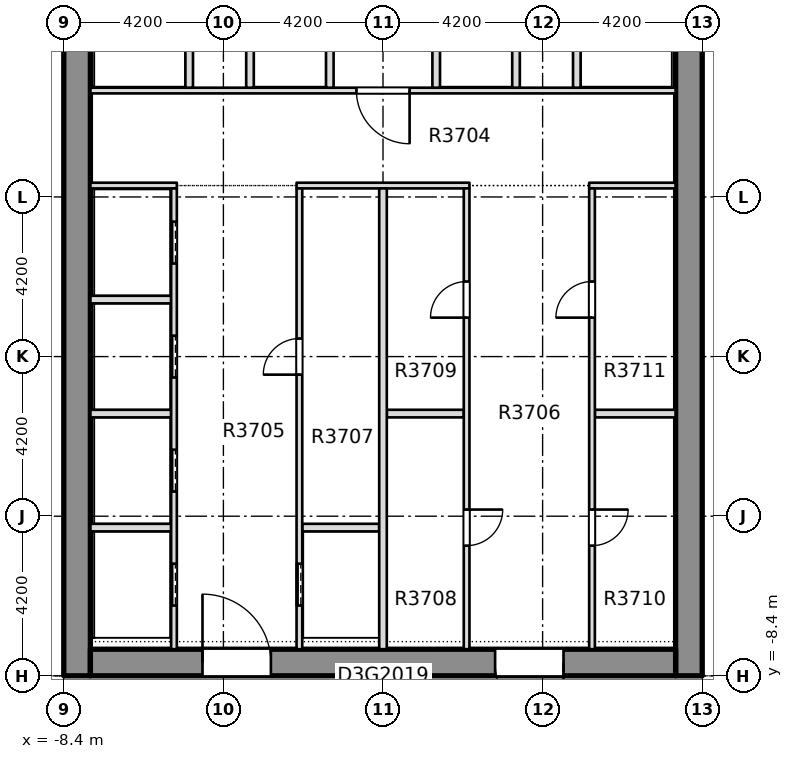
"""IFC4 building model, lengths in metres.
Left out: names, types, materials, properties, quantities, classifications, styles, units other than length and angle.
Written with IfcOpenShell. Run it as: python <this file> out.ifc"""

import sys

from ifc_helpers import new_model, si_unit, direction, frame, frame_2d, origin, place, context, subcontext, project, spatial, rectangle, extrude, element, fill, save


model = new_model("IFC4")
c1 = context("Model", 3, precision=1e-05, world=origin(), true_north=direction((0.0, 1.0)))
c2 = subcontext(c1, "Body", "Model", "MODEL_VIEW")
j1 = project(units=[si_unit("LENGTHUNIT", "METRE"), si_unit("PLANEANGLEUNIT", "RADIAN")], contexts=[c1])
p1 = place(None, origin())
s1 = spatial("IfcSite", under=j1, at=p1, CompositionType="ELEMENT")
p2 = place(p1, origin())
s2 = spatial("IfcBuilding", under=s1, at=p2, CompositionType="ELEMENT")
p3 = place(p2, frame((0.0, 0.0, 146.9)))
s3 = spatial("IfcBuildingStorey", under=s2, at=p3, CompositionType="ELEMENT", Elevation=146.9)
p4 = place(p3, frame((8.05, -8.4, -0.4), z_axis=(0.0, 0.0, 1.0), x_axis=(0.0, 1.0, 0.0)))
e1 = element("IfcWall", 1, at=p4, inside=s3, PredefinedType="SOLIDWALL", context=c2, shape_type="SweptSolid", body=[
    extrude(rectangle(XDim=30.15, YDim=0.7, at=frame_2d((15.075, 0.0))), origin(), (0.0, 0.0, 1.0), 3.45),
])
p5 = place(p4, frame((19.3, 0.0, 0.4)))
e2 = element("IfcOpeningElement", 2, at=p5, cuts=e1, PredefinedType="OPENING", context=c2, shape_type="SweptSolid", body=[
    extrude(rectangle(XDim=1.2, YDim=2.1, at=frame_2d((0.6, 1.05))), frame((0.0, 0.36, 0.0), z_axis=(0.0, -1.0, 0.0), x_axis=(1.0, 0.0, 0.0)), (0.0, 0.0, 1.0), 0.72),
])
p6 = place(p3, frame((-8.05, -8.4, -0.4), z_axis=(0.0, 0.0, 1.0), x_axis=(0.0, 1.0, 0.0)))
e3 = element("IfcWall", 3, at=p6, inside=s3, PredefinedType="SOLIDWALL", context=c2, shape_type="SweptSolid", body=[
    extrude(rectangle(XDim=30.15, YDim=0.7, at=frame_2d((15.075, 0.0))), origin(), (0.0, 0.0, 1.0), 3.45),
])
p7 = place(p6, frame((19.3, 0.0, 0.4)))
e4 = element("IfcOpeningElement", 4, at=p7, cuts=e3, PredefinedType="OPENING", context=c2, shape_type="SweptSolid", body=[
    extrude(rectangle(XDim=1.2, YDim=2.1, at=frame_2d((0.6, 1.05))), frame((0.0, 0.36, 0.0), z_axis=(0.0, -1.0, 0.0), x_axis=(1.0, 0.0, 0.0)), (0.0, 0.0, 1.0), 0.72),
])
p8 = place(p3, frame((-7.7, -8.05, -0.4), z_axis=(0.0, 0.0, 1.0), x_axis=(1.0, 0.0, 0.0)))
e5 = element("IfcWall", 5, at=p8, inside=s3, PredefinedType="SHEAR", context=c2, shape_type="SweptSolid", body=[
    extrude(rectangle(XDim=15.4, YDim=0.7, at=frame_2d((7.7, 0.0))), origin(), (0.0, 0.0, 1.0), 3.45),
])
p9 = place(p8, frame((2.95, 0.0, 0.4)))
e6 = element("IfcOpeningElement", 6, at=p9, cuts=e5, PredefinedType="OPENING", context=c2, shape_type="SweptSolid", body=[
    extrude(rectangle(XDim=1.8, YDim=2.1, at=frame_2d((0.9, 1.05))), frame((0.0, 0.36, 0.0), z_axis=(0.0, -1.0, 0.0), x_axis=(1.0, 0.0, 0.0)), (0.0, 0.0, 1.0), 0.72),
])
p10 = place(p8, frame((10.65, 0.0, 0.4)))
e7 = element("IfcOpeningElement", 7, at=p10, cuts=e5, PredefinedType="OPENING", context=c2, shape_type="SweptSolid", body=[
    extrude(rectangle(XDim=1.8, YDim=2.1, at=frame_2d((0.9, 1.05))), frame((0.0, 0.36, 0.0), z_axis=(0.0, -1.0, 0.0), x_axis=(1.0, 0.0, 0.0)), (0.0, 0.0, 1.0), 0.72),
])
p11 = place(p3, frame((-7.699, -4.5, 0.0), z_axis=(0.0, 0.0, 1.0), x_axis=(1.0, 0.0, 0.0)))
e8 = element("IfcWall", 8, at=p11, inside=s3, PredefinedType="PARTITIONING", context=c2, shape_type="SweptSolid", body=[
    extrude(rectangle(XDim=2.124, YDim=0.2, at=frame_2d((1.062, 0.0))), origin(), (0.0, 0.0, 1.0), 3.05),
])
p12 = place(p3, frame((-2.125, -4.5, 0.0), z_axis=(0.0, 0.0, 1.0), x_axis=(1.0, 0.0, 0.0)))
e9 = element("IfcWall", 9, at=p12, inside=s3, PredefinedType="PARTITIONING", context=c2, shape_type="SweptSolid", body=[
    extrude(rectangle(XDim=2.025, YDim=0.2, at=frame_2d((1.012, 0.0))), origin(), (0.0, 0.0, 1.0), 3.05),
])
p13 = place(p3, frame((-7.699, -1.5, 0.0), z_axis=(0.0, 0.0, 1.0), x_axis=(1.0, 0.0, 0.0)))
e10 = element("IfcWall", 10, at=p13, inside=s3, PredefinedType="PARTITIONING", context=c2, shape_type="SweptSolid", body=[
    extrude(rectangle(XDim=2.124, YDim=0.2, at=frame_2d((1.062, 0.0))), origin(), (0.0, 0.0, 1.0), 3.05),
])
p14 = place(p3, frame((0.1, -1.5, 0.0), z_axis=(0.0, 0.0, 1.0), x_axis=(1.0, 0.0, 0.0)))
e11 = element("IfcWall", 11, at=p14, inside=s3, PredefinedType="PARTITIONING", context=c2, shape_type="SweptSolid", body=[
    extrude(rectangle(XDim=2.025, YDim=0.2, at=frame_2d((1.012, 0.0))), origin(), (0.0, 0.0, 1.0), 3.05),
])
for number, where, z_axis, x_axis in (
    (12, (5.575, -1.5, 0.0), (0.0, 0.0, 1.0), (1.0, 0.0, 0.0)),
    (13, (-7.699, 1.5, 0.0), (0.0, 0.0, 1.0), (1.0, 0.0, 0.0)),
):
    element("IfcWall", number, at=place(p3, frame(where, z_axis=z_axis, x_axis=x_axis)), inside=s3, PredefinedType="PARTITIONING", context=c2, shape_type="SweptSolid", body=[
        extrude(rectangle(XDim=2.124, YDim=0.2, at=frame_2d((1.062, 0.0))), origin(), (0.0, 0.0, 1.0), 3.05),
    ])
p15 = place(p3, frame((-7.699, 4.5, 0.0), z_axis=(0.0, 0.0, 1.0), x_axis=(1.0, 0.0, 0.0)))
e14 = element("IfcWall", 14, at=p15, inside=s3, PredefinedType="PARTITIONING", context=c2, shape_type="SweptSolid", body=[
    extrude(rectangle(XDim=2.274, YDim=0.15, at=frame_2d((1.137, 0.0))), origin(), (0.0, 0.0, 1.0), 3.05),
])
p16 = place(p3, frame((-2.275, 4.5, 0.0), z_axis=(0.0, 0.0, 1.0), x_axis=(1.0, 0.0, 0.0)))
e15 = element("IfcWall", 15, at=p16, inside=s3, PredefinedType="PARTITIONING", context=c2, shape_type="SweptSolid", body=[
    extrude(rectangle(XDim=4.55, YDim=0.15, at=frame_2d((2.275, 0.0))), origin(), (0.0, 0.0, 1.0), 3.05),
])
p17 = place(p3, frame((5.425, 4.5, 0.0), z_axis=(0.0, 0.0, 1.0), x_axis=(1.0, 0.0, 0.0)))
e16 = element("IfcWall", 16, at=p17, inside=s3, PredefinedType="PARTITIONING", context=c2, shape_type="SweptSolid", body=[
    extrude(rectangle(XDim=2.274, YDim=0.15, at=frame_2d((1.137, 0.0))), origin(), (0.0, 0.0, 1.0), 3.05),
])
p18 = place(p3, frame((-7.699, 7.0, 0.0), z_axis=(0.0, 0.0, 1.0), x_axis=(1.0, 0.0, 0.0)))
e17 = element("IfcWall", 17, at=p18, inside=s3, PredefinedType="PARTITIONING", context=c2, shape_type="SweptSolid", body=[
    extrude(rectangle(XDim=15.398, YDim=0.15, at=frame_2d((7.699, 0.0))), origin(), (0.0, 0.0, 1.0), 3.05),
])
p19 = place(p18, frame((6.999, 0.0, 0.0)))
e18 = element("IfcOpeningElement", 18, at=p19, cuts=e17, PredefinedType="OPENING", context=c2, shape_type="SweptSolid", body=[
    extrude(rectangle(XDim=1.4, YDim=2.1, at=frame_2d((0.7, 1.05))), frame((0.0, 0.085, 0.0), z_axis=(0.0, -1.0, 0.0), x_axis=(1.0, 0.0, 0.0)), (0.0, 0.0, 1.0), 0.17),
])
p20 = place(p3, frame((-5.5, -7.699, 0.0), z_axis=(0.0, 0.0, 1.0), x_axis=(0.0, 1.0, 0.0)))
e19 = element("IfcWall", 19, at=p20, inside=s3, PredefinedType="PARTITIONING", context=c2, shape_type="SweptSolid", body=[
    extrude(rectangle(XDim=12.124, YDim=0.15, at=frame_2d((6.062, 0.0))), origin(), (0.0, 0.0, 1.0), 3.05),
])
p21 = place(p20, frame((1.149, 0.0, 0.0)))
e20 = element("IfcOpeningElement", 20, at=p21, cuts=e19, PredefinedType="OPENING", context=c2, shape_type="SweptSolid", body=[
    extrude(rectangle(XDim=1.1, YDim=2.1, at=frame_2d((0.55, 1.05))), frame((0.0, 0.085, 0.0), z_axis=(0.0, -1.0, 0.0), x_axis=(1.0, 0.0, 0.0)), (0.0, 0.0, 1.0), 0.17),
])
p22 = place(p20, frame((4.149, 0.0, 0.0)))
e21 = element("IfcOpeningElement", 21, at=p22, cuts=e19, PredefinedType="OPENING", context=c2, shape_type="SweptSolid", body=[
    extrude(rectangle(XDim=1.1, YDim=2.1, at=frame_2d((0.55, 1.05))), frame((0.0, 0.085, 0.0), z_axis=(0.0, -1.0, 0.0), x_axis=(1.0, 0.0, 0.0)), (0.0, 0.0, 1.0), 0.17),
])
p23 = place(p20, frame((7.149, 0.0, 0.0)))
e22 = element("IfcOpeningElement", 22, at=p23, cuts=e19, PredefinedType="OPENING", context=c2, shape_type="SweptSolid", body=[
    extrude(rectangle(XDim=1.1, YDim=2.1, at=frame_2d((0.55, 1.05))), frame((0.0, 0.085, 0.0), z_axis=(0.0, -1.0, 0.0), x_axis=(1.0, 0.0, 0.0)), (0.0, 0.0, 1.0), 0.17),
])
p24 = place(p20, frame((10.149, 0.0, 0.0)))
e23 = element("IfcOpeningElement", 23, at=p24, cuts=e19, PredefinedType="OPENING", context=c2, shape_type="SweptSolid", body=[
    extrude(rectangle(XDim=1.1, YDim=2.1, at=frame_2d((0.55, 1.05))), frame((0.0, 0.085, 0.0), z_axis=(0.0, -1.0, 0.0), x_axis=(1.0, 0.0, 0.0)), (0.0, 0.0, 1.0), 0.17),
])
p25 = place(p3, frame((-5.1, 7.075, 0.0), z_axis=(0.0, 0.0, 1.0), x_axis=(0.0, 1.0, 0.0)))
e24 = element("IfcWall", 24, at=p25, inside=s3, PredefinedType="PARTITIONING", context=c2, shape_type="SweptSolid", body=[
    extrude(rectangle(XDim=2.725, YDim=0.2, at=frame_2d((1.363, 0.0))), origin(), (0.0, 0.0, 1.0), 3.05),
])
p26 = place(p3, frame((-3.5, 7.075, 0.0), z_axis=(0.0, 0.0, 1.0), x_axis=(0.0, 1.0, 0.0)))
e25 = element("IfcWall", 25, at=p26, inside=s3, PredefinedType="PARTITIONING", context=c2, shape_type="SweptSolid", body=[
    extrude(rectangle(XDim=2.85, YDim=0.2, at=frame_2d((1.425, 0.0))), origin(), (0.0, 0.0, 1.0), 3.05),
])
p27 = place(p3, frame((-2.2, -7.699, 0.0), z_axis=(0.0, 0.0, 1.0), x_axis=(0.0, 1.0, 0.0)))
e26 = element("IfcWall", 26, at=p27, inside=s3, PredefinedType="PARTITIONING", context=c2, shape_type="SweptSolid", body=[
    extrude(rectangle(XDim=12.124, YDim=0.15, at=frame_2d((6.062, 0.0))), origin(), (0.0, 0.0, 1.0), 3.05),
])
p28 = place(p27, frame((1.149, 0.0, 0.0)))
e27 = element("IfcOpeningElement", 27, at=p28, cuts=e26, PredefinedType="OPENING", context=c2, shape_type="SweptSolid", body=[
    extrude(rectangle(XDim=1.1, YDim=2.1, at=frame_2d((0.55, 1.05))), frame((0.0, 0.085, 0.0), z_axis=(0.0, -1.0, 0.0), x_axis=(1.0, 0.0, 0.0)), (0.0, 0.0, 1.0), 0.17),
])
p29 = place(p27, frame((7.224, 0.0, 0.0)))
e28 = element("IfcOpeningElement", 28, at=p29, cuts=e26, PredefinedType="OPENING", context=c2, shape_type="SweptSolid", body=[
    extrude(rectangle(XDim=0.95, YDim=2.1, at=frame_2d((0.475, 1.05))), frame((0.0, 0.085, 0.0), z_axis=(0.0, -1.0, 0.0), x_axis=(1.0, 0.0, 0.0)), (0.0, 0.0, 1.0), 0.17),
])
p30 = place(p3, frame((-1.4, 7.075, 0.0), z_axis=(0.0, 0.0, 1.0), x_axis=(0.0, 1.0, 0.0)))
e29 = element("IfcWall", 29, at=p30, inside=s3, PredefinedType="PARTITIONING", context=c2, shape_type="SweptSolid", body=[
    extrude(rectangle(XDim=2.85, YDim=0.2, at=frame_2d((1.425, 0.0))), origin(), (0.0, 0.0, 1.0), 3.05),
])
p31 = place(p3, frame((0.0, -7.699, 0.0), z_axis=(0.0, 0.0, 1.0), x_axis=(0.0, 1.0, 0.0)))
e30 = element("IfcWall", 30, at=p31, inside=s3, PredefinedType="PARTITIONING", context=c2, shape_type="SweptSolid", body=[
    extrude(rectangle(XDim=12.124, YDim=0.2, at=frame_2d((6.062, 0.0))), origin(), (0.0, 0.0, 1.0), 3.05),
])
p32 = place(p3, frame((1.4, 7.075, 0.0), z_axis=(0.0, 0.0, 1.0), x_axis=(0.0, 1.0, 0.0)))
e31 = element("IfcWall", 31, at=p32, inside=s3, PredefinedType="PARTITIONING", context=c2, shape_type="SweptSolid", body=[
    extrude(rectangle(XDim=2.85, YDim=0.2, at=frame_2d((1.425, 0.0))), origin(), (0.0, 0.0, 1.0), 3.05),
])
p33 = place(p3, frame((2.2, -7.699, 0.0), z_axis=(0.0, 0.0, 1.0), x_axis=(0.0, 1.0, 0.0)))
e32 = element("IfcWall", 32, at=p33, inside=s3, PredefinedType="PARTITIONING", context=c2, shape_type="SweptSolid", body=[
    extrude(rectangle(XDim=12.124, YDim=0.15, at=frame_2d((6.062, 0.0))), origin(), (0.0, 0.0, 1.0), 3.05),
])
p34 = place(p33, frame((2.724, 0.0, 0.0)))
e33 = element("IfcOpeningElement", 33, at=p34, cuts=e32, PredefinedType="OPENING", context=c2, shape_type="SweptSolid", body=[
    extrude(rectangle(XDim=0.95, YDim=2.1, at=frame_2d((0.475, 1.05))), frame((0.0, 0.085, 0.0), z_axis=(0.0, -1.0, 0.0), x_axis=(1.0, 0.0, 0.0)), (0.0, 0.0, 1.0), 0.17),
])
p35 = place(p33, frame((8.724, 0.0, 0.0)))
e34 = element("IfcOpeningElement", 34, at=p35, cuts=e32, PredefinedType="OPENING", context=c2, shape_type="SweptSolid", body=[
    extrude(rectangle(XDim=0.95, YDim=2.1, at=frame_2d((0.475, 1.05))), frame((0.0, 0.085, 0.0), z_axis=(0.0, -1.0, 0.0), x_axis=(1.0, 0.0, 0.0)), (0.0, 0.0, 1.0), 0.17),
])
p36 = place(p3, frame((3.5, 7.075, 0.0), z_axis=(0.0, 0.0, 1.0), x_axis=(0.0, 1.0, 0.0)))
e35 = element("IfcWall", 35, at=p36, inside=s3, PredefinedType="PARTITIONING", context=c2, shape_type="SweptSolid", body=[
    extrude(rectangle(XDim=2.85, YDim=0.2, at=frame_2d((1.425, 0.0))), origin(), (0.0, 0.0, 1.0), 3.05),
])
p37 = place(p3, frame((5.1, 7.075, 0.0), z_axis=(0.0, 0.0, 1.0), x_axis=(0.0, 1.0, 0.0)))
e36 = element("IfcWall", 36, at=p37, inside=s3, PredefinedType="PARTITIONING", context=c2, shape_type="SweptSolid", body=[
    extrude(rectangle(XDim=2.725, YDim=0.2, at=frame_2d((1.363, 0.0))), origin(), (0.0, 0.0, 1.0), 3.05),
])
p38 = place(p3, frame((5.5, -7.699, 0.0), z_axis=(0.0, 0.0, 1.0), x_axis=(0.0, 1.0, 0.0)))
e37 = element("IfcWall", 37, at=p38, inside=s3, PredefinedType="PARTITIONING", context=c2, shape_type="SweptSolid", body=[
    extrude(rectangle(XDim=12.124, YDim=0.15, at=frame_2d((6.062, 0.0))), origin(), (0.0, 0.0, 1.0), 3.05),
])
p39 = place(p38, frame((2.724, 0.0, 0.0)))
e38 = element("IfcOpeningElement", 38, at=p39, cuts=e37, PredefinedType="OPENING", context=c2, shape_type="SweptSolid", body=[
    extrude(rectangle(XDim=0.95, YDim=2.1, at=frame_2d((0.475, 1.05))), frame((0.0, 0.085, 0.0), z_axis=(0.0, -1.0, 0.0), x_axis=(1.0, 0.0, 0.0)), (0.0, 0.0, 1.0), 0.17),
])
p40 = place(p38, frame((8.724, 0.0, 0.0)))
e39 = element("IfcOpeningElement", 39, at=p40, cuts=e37, PredefinedType="OPENING", context=c2, shape_type="SweptSolid", body=[
    extrude(rectangle(XDim=0.95, YDim=2.1, at=frame_2d((0.475, 1.05))), frame((0.0, 0.085, 0.0), z_axis=(0.0, -1.0, 0.0), x_axis=(1.0, 0.0, 0.0)), (0.0, 0.0, 1.0), 0.17),
])
p41 = place(p21, origin())
e40 = element("IfcDoor", 40, at=p41, inside=s3, OperationType="SLIDING_TO_LEFT", PredefinedType="DOOR", context=c2, shape_type="SweptSolid", body=[
    extrude(rectangle(XDim=1.1, YDim=2.1, at=frame_2d((0.55, 1.05))), frame((0.0, 0.025, 0.0), z_axis=(0.0, -1.0, 0.0), x_axis=(1.0, 0.0, 0.0)), (0.0, 0.0, 1.0), 0.05),
])
fill(e20, e40)
p42 = place(p22, origin())
e41 = element("IfcDoor", 41, at=p42, inside=s3, OperationType="SLIDING_TO_LEFT", PredefinedType="DOOR", context=c2, shape_type="SweptSolid", body=[
    extrude(rectangle(XDim=1.1, YDim=2.1, at=frame_2d((0.55, 1.05))), frame((0.0, 0.025, 0.0), z_axis=(0.0, -1.0, 0.0), x_axis=(1.0, 0.0, 0.0)), (0.0, 0.0, 1.0), 0.05),
])
fill(e21, e41)
p43 = place(p23, origin())
e42 = element("IfcDoor", 42, at=p43, inside=s3, OperationType="SLIDING_TO_LEFT", PredefinedType="DOOR", context=c2, shape_type="SweptSolid", body=[
    extrude(rectangle(XDim=1.1, YDim=2.1, at=frame_2d((0.55, 1.05))), frame((0.0, 0.025, 0.0), z_axis=(0.0, -1.0, 0.0), x_axis=(1.0, 0.0, 0.0)), (0.0, 0.0, 1.0), 0.05),
])
fill(e22, e42)
p44 = place(p24, origin())
e43 = element("IfcDoor", 43, at=p44, inside=s3, OperationType="SLIDING_TO_LEFT", PredefinedType="DOOR", context=c2, shape_type="SweptSolid", body=[
    extrude(rectangle(XDim=1.1, YDim=2.1, at=frame_2d((0.55, 1.05))), frame((0.0, 0.025, 0.0), z_axis=(0.0, -1.0, 0.0), x_axis=(1.0, 0.0, 0.0)), (0.0, 0.0, 1.0), 0.05),
])
fill(e23, e43)
p45 = place(p28, origin())
e44 = element("IfcDoor", 44, at=p45, inside=s3, OperationType="SLIDING_TO_LEFT", PredefinedType="DOOR", context=c2, shape_type="SweptSolid", body=[
    extrude(rectangle(XDim=1.1, YDim=2.1, at=frame_2d((0.55, 1.05))), frame((0.0, 0.025, 0.0), z_axis=(0.0, -1.0, 0.0), x_axis=(1.0, 0.0, 0.0)), (0.0, 0.0, 1.0), 0.05),
])
fill(e27, e44)
p46 = place(p29, origin())
e45 = element("IfcDoor", 45, at=p46, inside=s3, OperationType="SINGLE_SWING_RIGHT", PredefinedType="DOOR", context=c2, shape_type="SweptSolid", body=[
    extrude(rectangle(XDim=0.95, YDim=2.1, at=frame_2d((0.475, 1.05))), frame((0.0, 0.025, 0.0), z_axis=(0.0, -1.0, 0.0), x_axis=(1.0, 0.0, 0.0)), (0.0, 0.0, 1.0), 0.05),
])
fill(e28, e45)
p47 = place(p34, origin())
e46 = element("IfcDoor", 46, at=p47, inside=s3, OperationType="SINGLE_SWING_RIGHT", PredefinedType="DOOR", context=c2, shape_type="SweptSolid", body=[
    extrude(rectangle(XDim=0.95, YDim=2.1, at=frame_2d((0.475, 1.05))), frame((0.0, 0.025, 0.0), z_axis=(0.0, -1.0, 0.0), x_axis=(1.0, 0.0, 0.0)), (0.0, 0.0, 1.0), 0.05),
])
fill(e33, e46)
p48 = place(p35, origin())
e47 = element("IfcDoor", 47, at=p48, inside=s3, OperationType="SINGLE_SWING_RIGHT", PredefinedType="DOOR", context=c2, shape_type="SweptSolid", body=[
    extrude(rectangle(XDim=0.95, YDim=2.1, at=frame_2d((0.475, 1.05))), frame((0.0, 0.025, 0.0), z_axis=(0.0, -1.0, 0.0), x_axis=(1.0, 0.0, 0.0)), (0.0, 0.0, 1.0), 0.05),
])
fill(e34, e47)
p49 = place(p39, origin())
e48 = element("IfcDoor", 48, at=p49, inside=s3, OperationType="SINGLE_SWING_LEFT", PredefinedType="DOOR", context=c2, shape_type="SweptSolid", body=[
    extrude(rectangle(XDim=0.95, YDim=2.1, at=frame_2d((0.475, 1.05))), frame((0.0, 0.025, 0.0), z_axis=(0.0, -1.0, 0.0), x_axis=(1.0, 0.0, 0.0)), (0.0, 0.0, 1.0), 0.05),
])
fill(e38, e48)
p50 = place(p40, origin())
e49 = element("IfcDoor", 49, at=p50, inside=s3, OperationType="SINGLE_SWING_LEFT", PredefinedType="DOOR", context=c2, shape_type="SweptSolid", body=[
    extrude(rectangle(XDim=0.95, YDim=2.1, at=frame_2d((0.475, 1.05))), frame((0.0, 0.025, 0.0), z_axis=(0.0, -1.0, 0.0), x_axis=(1.0, 0.0, 0.0)), (0.0, 0.0, 1.0), 0.05),
])
fill(e39, e49)
p51 = place(p19, origin())
e50 = element("IfcDoor", 50, at=p51, inside=s3, OperationType="SINGLE_SWING_RIGHT", PredefinedType="DOOR", context=c2, shape_type="SweptSolid", body=[
    extrude(rectangle(XDim=1.4, YDim=2.1, at=frame_2d((0.7, 1.05))), frame((0.0, 0.025, 0.0), z_axis=(0.0, -1.0, 0.0), x_axis=(1.0, 0.0, 0.0)), (0.0, 0.0, 1.0), 0.05),
])
fill(e18, e50)
p52 = place(p9, origin())
e51 = element("IfcDoor", 51, at=p52, inside=s3, OperationType="SINGLE_SWING_LEFT", PredefinedType="DOOR", context=c2, shape_type="SweptSolid", body=[
    extrude(rectangle(XDim=1.8, YDim=2.1, at=frame_2d((0.9, 1.05))), frame((0.0, 0.025, 0.0), z_axis=(0.0, -1.0, 0.0), x_axis=(1.0, 0.0, 0.0)), (0.0, 0.0, 1.0), 0.05),
])
fill(e6, e51)
p53 = place(p10, origin())
e52 = element("IfcDoor", 52, at=p53, inside=s3, OperationType="SINGLE_SWING_LEFT", PredefinedType="DOOR", context=c2, shape_type="SweptSolid", body=[
    extrude(rectangle(XDim=1.8, YDim=2.1, at=frame_2d((0.9, 1.05))), frame((0.0, 0.025, 0.0), z_axis=(0.0, -1.0, 0.0), x_axis=(1.0, 0.0, 0.0)), (0.0, 0.0, 1.0), 0.05),
])
fill(e7, e52)
save(model, sys.argv[1])
